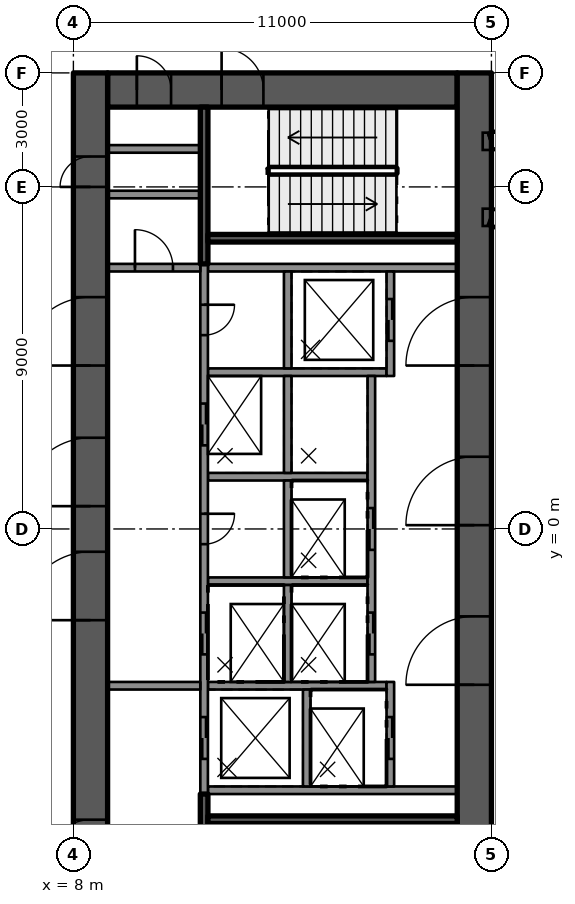
"""IFC4 building model, lengths in metres.
Left out: names, types, materials, properties, quantities, classifications, styles, units other than length and angle.
Written with IfcOpenShell. Run it as: python <this file> out.ifc"""

import sys

from ifc_helpers import new_model, si_unit, direction, frame, frame_2d, origin, place, context, subcontext, project, spatial, rectangle, extrude, element, fill, save


model = new_model("IFC4")
c1 = context("Model", 3, precision=1e-05, world=origin(), true_north=direction((0.0, 1.0)))
c2 = subcontext(c1, "Body", "Model", "MODEL_VIEW")
j1 = project(units=[si_unit("LENGTHUNIT", "METRE"), si_unit("PLANEANGLEUNIT", "RADIAN")], contexts=[c1])
p1 = place(None, origin())
s1 = spatial("IfcSite", under=j1, at=p1, CompositionType="ELEMENT")
p2 = place(p1, origin())
s2 = spatial("IfcBuilding", under=s1, at=p2, CompositionType="ELEMENT")
p3 = place(p2, frame((0.0, 0.0, 141.2)))
s3 = spatial("IfcBuildingStorey", under=s2, at=p3, CompositionType="ELEMENT", Elevation=141.2)
p4 = place(p3, frame((8.9, 11.55, 0.0), z_axis=(0.0, 0.0, 1.0), x_axis=(1.0, 0.0, 0.0)))
e1 = element("IfcWall", 1, at=p4, inside=s3, PredefinedType="SHEAR", context=c2, shape_type="SweptSolid", body=[
    extrude(rectangle(XDim=9.2, YDim=0.9, at=frame_2d((4.6, 0.0))), origin(), (0.0, 0.0, 1.0), 4.4),
])
p5 = place(p4, frame((3.0, 0.0, 0.0)))
e2 = element("IfcOpeningElement", 2, at=p5, cuts=e1, PredefinedType="OPENING", context=c2, shape_type="SweptSolid", body=[
    extrude(rectangle(XDim=1.1, YDim=2.1, at=frame_2d((0.55, 1.05))), frame((0.0, 0.46, 0.0), z_axis=(0.0, -1.0, 0.0), x_axis=(1.0, 0.0, 0.0)), (0.0, 0.0, 1.0), 0.92),
])
p6 = place(p4, frame((0.77, 0.0, 0.0)))
e3 = element("IfcOpeningElement", 3, at=p6, cuts=e1, PredefinedType="OPENING", context=c2, shape_type="SweptSolid", body=[
    extrude(rectangle(XDim=0.9, YDim=2.1, at=frame_2d((0.45, 1.05))), frame((0.0, 0.46, 0.0), z_axis=(0.0, -1.0, 0.0), x_axis=(1.0, 0.0, 0.0)), (0.0, 0.0, 1.0), 0.92),
])
p7 = place(p3, frame((8.45, -12.0, 0.0), z_axis=(0.0, 0.0, 1.0), x_axis=(0.0, 1.0, 0.0)))
e4 = element("IfcWall", 4, at=p7, inside=s3, PredefinedType="SHEAR", context=c2, shape_type="SweptSolid", body=[
    extrude(rectangle(XDim=24.0, YDim=0.9, at=frame_2d((12.0, 0.0))), origin(), (0.0, 0.0, 1.0), 4.4),
])
p8 = place(p7, frame((12.6, 0.0, 0.0)))
e5 = element("IfcOpeningElement", 5, at=p8, cuts=e4, PredefinedType="OPENING", context=c2, shape_type="SweptSolid", body=[
    extrude(rectangle(XDim=1.8, YDim=2.1, at=frame_2d((0.9, 1.05))), frame((0.0, 0.46, 0.0), z_axis=(0.0, -1.0, 0.0), x_axis=(1.0, 0.0, 0.0)), (0.0, 0.0, 1.0), 0.92),
])
p9 = place(p7, frame((16.3, 0.0, 0.0)))
e6 = element("IfcOpeningElement", 6, at=p9, cuts=e4, PredefinedType="OPENING", context=c2, shape_type="SweptSolid", body=[
    extrude(rectangle(XDim=1.8, YDim=2.1, at=frame_2d((0.9, 1.05))), frame((0.0, 0.46, 0.0), z_axis=(0.0, -1.0, 0.0), x_axis=(1.0, 0.0, 0.0)), (0.0, 0.0, 1.0), 0.92),
])
p10 = place(p7, frame((9.6, 0.0, 0.0)))
e7 = element("IfcOpeningElement", 7, at=p10, cuts=e4, PredefinedType="OPENING", context=c2, shape_type="SweptSolid", body=[
    extrude(rectangle(XDim=1.8, YDim=2.1, at=frame_2d((0.9, 1.05))), frame((0.0, 0.46, 0.0), z_axis=(0.0, -1.0, 0.0), x_axis=(1.0, 0.0, 0.0)), (0.0, 0.0, 1.0), 0.92),
])
p11 = place(p7, frame((3.25, 0.0, 0.0)))
e8 = element("IfcOpeningElement", 8, at=p11, cuts=e4, PredefinedType="OPENING", context=c2, shape_type="SweptSolid", body=[
    extrude(rectangle(XDim=1.1, YDim=2.1, at=frame_2d((0.55, 1.05))), frame((0.0, 0.46, 0.0), z_axis=(0.0, -1.0, 0.0), x_axis=(1.0, 0.0, 0.0)), (0.0, 0.0, 1.0), 0.92),
])
p12 = place(p7, frame((21.0, 0.0, 0.0)))
e9 = element("IfcOpeningElement", 9, at=p12, cuts=e4, PredefinedType="OPENING", context=c2, shape_type="SweptSolid", body=[
    extrude(rectangle(XDim=0.8, YDim=2.1, at=frame_2d((0.4, 1.05))), frame((0.0, 0.46, 0.0), z_axis=(0.0, -1.0, 0.0), x_axis=(1.0, 0.0, 0.0)), (0.0, 0.0, 1.0), 0.92),
])
p13 = place(p3, frame((18.55, -12.0, 0.0), z_axis=(0.0, 0.0, 1.0), x_axis=(0.0, 1.0, 0.0)))
e10 = element("IfcWall", 10, at=p13, inside=s3, PredefinedType="SHEAR", context=c2, shape_type="SweptSolid", body=[
    extrude(rectangle(XDim=24.0, YDim=0.9, at=frame_2d((12.0, 0.0))), origin(), (0.0, 0.0, 1.0), 4.4),
])
p14 = place(p13, frame((16.3, 0.0, 0.0)))
e11 = element("IfcOpeningElement", 11, at=p14, cuts=e10, PredefinedType="OPENING", context=c2, shape_type="SweptSolid", body=[
    extrude(rectangle(XDim=1.8, YDim=2.1, at=frame_2d((0.9, 1.05))), frame((0.0, 0.46, 0.0), z_axis=(0.0, -1.0, 0.0), x_axis=(1.0, 0.0, 0.0)), (0.0, 0.0, 1.0), 0.92),
])
p15 = place(p13, frame((12.1, 0.0, 0.0)))
e12 = element("IfcOpeningElement", 12, at=p15, cuts=e10, PredefinedType="OPENING", context=c2, shape_type="SweptSolid", body=[
    extrude(rectangle(XDim=1.8, YDim=2.1, at=frame_2d((0.9, 1.05))), frame((0.0, 0.46, 0.0), z_axis=(0.0, -1.0, 0.0), x_axis=(1.0, 0.0, 0.0)), (0.0, 0.0, 1.0), 0.92),
])
p16 = place(p13, frame((7.9, 0.0, 0.0)))
e13 = element("IfcOpeningElement", 13, at=p16, cuts=e10, PredefinedType="OPENING", context=c2, shape_type="SweptSolid", body=[
    extrude(rectangle(XDim=1.8, YDim=2.1, at=frame_2d((0.9, 1.05))), frame((0.0, 0.46, 0.0), z_axis=(0.0, -1.0, 0.0), x_axis=(1.0, 0.0, 0.0)), (0.0, 0.0, 1.0), 0.92),
])
for number, where, z_axis, x_axis in (
    (14, (11.54, -6.875, 0.0), (0.0, 0.0, 1.0), (1.0, 0.0, 0.0)),
    (15, (11.54, 6.875, 0.0), (0.0, 0.0, 1.0), (1.0, 0.0, 0.0)),
):
    element("IfcWall", number, at=place(p3, frame(where, z_axis=z_axis, x_axis=x_axis)), inside=s3, PredefinedType="SOLIDWALL", context=c2, shape_type="SweptSolid", body=[
        extrude(rectangle(XDim=6.56, YDim=0.2, at=frame_2d((3.28, 0.0))), origin(), (0.0, 0.0, 1.0), 3.99),
    ])
p17 = place(p3, frame((11.54, 4.125, 0.0), z_axis=(0.0, 0.0, 1.0), x_axis=(1.0, 0.0, 0.0)))
e16 = element("IfcWall", 16, at=p17, inside=s3, PredefinedType="SOLIDWALL", context=c2, shape_type="SweptSolid", body=[
    extrude(rectangle(XDim=4.7, YDim=0.2, at=frame_2d((2.35, 0.0))), origin(), (0.0, 0.0, 1.0), 3.99),
])
for number, where, z_axis, x_axis in (
    (17, (11.54, 1.375, 0.0), (0.0, 0.0, 1.0), (1.0, 0.0, 0.0)),
    (18, (11.54, -1.375, 0.0), (0.0, 0.0, 1.0), (1.0, 0.0, 0.0)),
):
    element("IfcWall", number, at=place(p3, frame(where, z_axis=z_axis, x_axis=x_axis)), inside=s3, PredefinedType="SOLIDWALL", context=c2, shape_type="SweptSolid", body=[
        extrude(rectangle(XDim=4.2, YDim=0.2, at=frame_2d((2.1, 0.0))), origin(), (0.0, 0.0, 1.0), 3.99),
    ])
p18 = place(p3, frame((11.54, -4.125, 0.0), z_axis=(0.0, 0.0, 1.0), x_axis=(1.0, 0.0, 0.0)))
e19 = element("IfcWall", 19, at=p18, inside=s3, PredefinedType="SOLIDWALL", context=c2, shape_type="SweptSolid", body=[
    extrude(rectangle(XDim=4.7, YDim=0.2, at=frame_2d((2.35, 0.0))), origin(), (0.0, 0.0, 1.0), 3.99),
])
p19 = place(p3, frame((11.44, 6.975, 0.0), z_axis=(0.0, 0.0, 1.0), x_axis=(0.0, -1.0, 0.0)))
e20 = element("IfcWall", 20, at=p19, inside=s3, PredefinedType="SOLIDWALL", context=c2, shape_type="SweptSolid", body=[
    extrude(rectangle(XDim=13.95, YDim=0.2, at=frame_2d((6.975, 0.0))), origin(), (0.0, 0.0, 1.0), 3.99),
])
p20 = place(p19, frame((3.675, 0.0, 0.0)))
e21 = element("IfcOpeningElement", 21, at=p20, cuts=e20, PredefinedType="OPENING", context=c2, shape_type="SweptSolid", body=[
    extrude(rectangle(XDim=1.1, YDim=2.1, at=frame_2d((0.55, 1.05))), frame((0.0, 0.11, 0.0), z_axis=(0.0, -1.0, 0.0), x_axis=(1.0, 0.0, 0.0)), (0.0, 0.0, 1.0), 0.22),
])
p21 = place(p19, frame((9.175, 0.0, 0.0)))
e22 = element("IfcOpeningElement", 22, at=p21, cuts=e20, PredefinedType="OPENING", context=c2, shape_type="SweptSolid", body=[
    extrude(rectangle(XDim=1.1, YDim=2.1, at=frame_2d((0.55, 1.05))), frame((0.0, 0.11, 0.0), z_axis=(0.0, -1.0, 0.0), x_axis=(1.0, 0.0, 0.0)), (0.0, 0.0, 1.0), 0.22),
])
p22 = place(p19, frame((11.925, 0.0, 0.0)))
e23 = element("IfcOpeningElement", 23, at=p22, cuts=e20, PredefinedType="OPENING", context=c2, shape_type="SweptSolid", body=[
    extrude(rectangle(XDim=1.1, YDim=2.1, at=frame_2d((0.55, 1.05))), frame((0.0, 0.11, 0.0), z_axis=(0.0, -1.0, 0.0), x_axis=(1.0, 0.0, 0.0)), (0.0, 0.0, 1.0), 0.22),
])
p23 = place(p19, frame((1.075, 0.0, 0.0)))
e24 = element("IfcOpeningElement", 24, at=p23, cuts=e20, PredefinedType="OPENING", context=c2, shape_type="SweptSolid", body=[
    extrude(rectangle(XDim=0.8, YDim=2.1, at=frame_2d((0.4, 1.05))), frame((0.0, 0.11, 0.0), z_axis=(0.0, -1.0, 0.0), x_axis=(1.0, 0.0, 0.0)), (0.0, 0.0, 1.0), 0.22),
])
p24 = place(p19, frame((6.575, 0.0, 0.0)))
e25 = element("IfcOpeningElement", 25, at=p24, cuts=e20, PredefinedType="OPENING", context=c2, shape_type="SweptSolid", body=[
    extrude(rectangle(XDim=0.8, YDim=2.1, at=frame_2d((0.4, 1.05))), frame((0.0, 0.11, 0.0), z_axis=(0.0, -1.0, 0.0), x_axis=(1.0, 0.0, 0.0)), (0.0, 0.0, 1.0), 0.22),
])
for number, where, z_axis, x_axis in (
    (26, (13.64, 6.775, 0.0), (0.0, 0.0, 1.0), (0.0, -1.0, 0.0)),
    (27, (13.64, 4.025, 0.0), (0.0, 0.0, 1.0), (0.0, -1.0, 0.0)),
    (28, (13.64, 1.275, 0.0), (0.0, 0.0, 1.0), (0.0, -1.0, 0.0)),
    (29, (13.64, -1.475, 0.0), (0.0, 0.0, 1.0), (0.0, -1.0, 0.0)),
    (30, (14.14, -4.225, 0.0), (0.0, 0.0, 1.0), (0.0, -1.0, 0.0)),
):
    element("IfcWall", number, at=place(p3, frame(where, z_axis=z_axis, x_axis=x_axis)), inside=s3, PredefinedType="SOLIDWALL", context=c2, shape_type="SweptSolid", body=[
        extrude(rectangle(XDim=2.55, YDim=0.2, at=frame_2d((1.275, 0.0))), origin(), (0.0, 0.0, 1.0), 3.99),
    ])
p25 = place(p3, frame((16.34, 6.775, 0.0), z_axis=(0.0, 0.0, 1.0), x_axis=(0.0, -1.0, 0.0)))
e31 = element("IfcWall", 31, at=p25, inside=s3, PredefinedType="SOLIDWALL", context=c2, shape_type="SweptSolid", body=[
    extrude(rectangle(XDim=2.75, YDim=0.2, at=frame_2d((1.375, 0.0))), origin(), (0.0, 0.0, 1.0), 3.99),
])
p26 = place(p25, frame((0.725, 0.0, 0.0)))
e32 = element("IfcOpeningElement", 32, at=p26, cuts=e31, PredefinedType="OPENING", context=c2, shape_type="SweptSolid", body=[
    extrude(rectangle(XDim=1.1, YDim=2.1, at=frame_2d((0.55, 1.05))), frame((0.0, 0.11, 0.0), z_axis=(0.0, -1.0, 0.0), x_axis=(1.0, 0.0, 0.0)), (0.0, 0.0, 1.0), 0.22),
])
p27 = place(p3, frame((15.84, 4.025, 0.0), z_axis=(0.0, 0.0, 1.0), x_axis=(0.0, -1.0, 0.0)))
e33 = element("IfcWall", 33, at=p27, inside=s3, PredefinedType="SOLIDWALL", context=c2, shape_type="SweptSolid", body=[
    extrude(rectangle(XDim=8.05, YDim=0.2, at=frame_2d((4.025, 0.0))), origin(), (0.0, 0.0, 1.0), 3.99),
])
p28 = place(p27, frame((3.475, 0.0, 0.0)))
e34 = element("IfcOpeningElement", 34, at=p28, cuts=e33, PredefinedType="OPENING", context=c2, shape_type="SweptSolid", body=[
    extrude(rectangle(XDim=1.1, YDim=2.1, at=frame_2d((0.55, 1.05))), frame((0.0, 0.11, 0.0), z_axis=(0.0, -1.0, 0.0), x_axis=(1.0, 0.0, 0.0)), (0.0, 0.0, 1.0), 0.22),
])
p29 = place(p27, frame((6.225, 0.0, 0.0)))
e35 = element("IfcOpeningElement", 35, at=p29, cuts=e33, PredefinedType="OPENING", context=c2, shape_type="SweptSolid", body=[
    extrude(rectangle(XDim=1.1, YDim=2.1, at=frame_2d((0.55, 1.05))), frame((0.0, 0.11, 0.0), z_axis=(0.0, -1.0, 0.0), x_axis=(1.0, 0.0, 0.0)), (0.0, 0.0, 1.0), 0.22),
])
p30 = place(p3, frame((16.34, -4.025, 0.0), z_axis=(0.0, 0.0, 1.0), x_axis=(0.0, -1.0, 0.0)))
e36 = element("IfcWall", 36, at=p30, inside=s3, PredefinedType="SOLIDWALL", context=c2, shape_type="SweptSolid", body=[
    extrude(rectangle(XDim=2.75, YDim=0.2, at=frame_2d((1.375, 0.0))), origin(), (0.0, 0.0, 1.0), 3.99),
])
p31 = place(p30, frame((0.925, 0.0, 0.0)))
e37 = element("IfcOpeningElement", 37, at=p31, cuts=e36, PredefinedType="OPENING", context=c2, shape_type="SweptSolid", body=[
    extrude(rectangle(XDim=1.1, YDim=2.1, at=frame_2d((0.55, 1.05))), frame((0.0, 0.11, 0.0), z_axis=(0.0, -1.0, 0.0), x_axis=(1.0, 0.0, 0.0)), (0.0, 0.0, 1.0), 0.22),
])
p32 = place(p3, frame((11.44, -6.975, 0.0), z_axis=(0.0, 0.0, 1.0), x_axis=(0.0, -1.0, 0.0)))
e38 = element("IfcWall", 38, at=p32, inside=s3, PredefinedType="SOLIDWALL", context=c2, shape_type="SweptSolid", body=[
    extrude(rectangle(XDim=4.125, YDim=0.2, at=frame_2d((2.062, 0.0))), origin(), (0.0, 0.0, 1.0), 3.99),
])
p33 = place(p32, frame((2.1, 0.0, 0.0)))
e39 = element("IfcOpeningElement", 39, at=p33, cuts=e38, PredefinedType="OPENING", context=c2, shape_type="SweptSolid", body=[
    extrude(rectangle(XDim=1.1, YDim=2.1, at=frame_2d((0.55, 1.05))), frame((0.0, 0.11, 0.0), z_axis=(0.0, -1.0, 0.0), x_axis=(1.0, 0.0, 0.0)), (0.0, 0.0, 1.0), 0.22),
])
p34 = place(p3, frame((11.54, -7.65, 0.0), z_axis=(0.0, 0.0, 1.0), x_axis=(1.0, 0.0, 0.0)))
e40 = element("IfcWall", 40, at=p34, inside=s3, PredefinedType="SOLIDWALL", context=c2, shape_type="SweptSolid", body=[
    extrude(rectangle(XDim=6.56, YDim=0.2, at=frame_2d((3.28, 0.0))), origin(), (0.0, 0.0, 1.0), 3.99),
])
p35 = place(p3, frame((11.44, 11.1, 0.0), z_axis=(0.0, 0.0, 1.0), x_axis=(0.0, -1.0, 0.0)))
e41 = element("IfcWall", 41, at=p35, inside=s3, PredefinedType="SOLIDWALL", context=c2, shape_type="SweptSolid", body=[
    extrude(rectangle(XDim=4.125, YDim=0.2, at=frame_2d((2.062, 0.0))), origin(), (0.0, 0.0, 1.0), 3.99),
])
p36 = place(p3, frame((11.54, 7.65, 0.0), z_axis=(0.0, 0.0, 1.0), x_axis=(1.0, 0.0, 0.0)))
e42 = element("IfcWall", 42, at=p36, inside=s3, PredefinedType="SOLIDWALL", context=c2, shape_type="SweptSolid", body=[
    extrude(rectangle(XDim=6.56, YDim=0.2, at=frame_2d((3.28, 0.0))), origin(), (0.0, 0.0, 1.0), 3.99),
])
p37 = place(p3, frame((8.9, -4.125, 0.0), z_axis=(0.0, 0.0, 1.0), x_axis=(1.0, 0.0, 0.0)))
e43 = element("IfcWall", 43, at=p37, inside=s3, PredefinedType="PARTITIONING", context=c2, shape_type="SweptSolid", body=[
    extrude(rectangle(XDim=2.44, YDim=0.2, at=frame_2d((1.22, 0.0))), origin(), (0.0, 0.0, 1.0), 3.99),
])
p38 = place(p3, frame((8.9, 6.875, 0.0), z_axis=(0.0, 0.0, 1.0), x_axis=(1.0, 0.0, 0.0)))
e44 = element("IfcWall", 44, at=p38, inside=s3, PredefinedType="PARTITIONING", context=c2, shape_type="SweptSolid", body=[
    extrude(rectangle(XDim=2.44, YDim=0.2, at=frame_2d((1.22, 0.0))), origin(), (0.0, 0.0, 1.0), 3.99),
])
p39 = place(p38, frame((0.72, 0.0, 0.0)))
e45 = element("IfcOpeningElement", 45, at=p39, cuts=e44, PredefinedType="OPENING", context=c2, shape_type="SweptSolid", body=[
    extrude(rectangle(XDim=1.0, YDim=2.1, at=frame_2d((0.5, 1.05))), frame((0.0, 0.11, 0.0), z_axis=(0.0, -1.0, 0.0), x_axis=(1.0, 0.0, 0.0)), (0.0, 0.0, 1.0), 0.22),
])
for number, where, z_axis, x_axis in (
    (46, (8.9, 10.0, 0.0), (0.0, 0.0, 1.0), (1.0, 0.0, 0.0)),
    (47, (8.9, 8.8, 0.0), (0.0, 0.0, 1.0), (1.0, 0.0, 0.0)),
):
    element("IfcWall", number, at=place(p3, frame(where, z_axis=z_axis, x_axis=x_axis)), inside=s3, PredefinedType="PARTITIONING", context=c2, shape_type="SweptSolid", body=[
        extrude(rectangle(XDim=2.44, YDim=0.2, at=frame_2d((1.22, 0.0))), origin(), (0.0, 0.0, 1.0), 3.99),
    ])
p40 = place(p26, origin())
e48 = element("IfcDoor", 48, at=p40, inside=s3, OperationType="DOUBLE_DOOR_SLIDING", PredefinedType="DOOR", context=c2, shape_type="SweptSolid", body=[
    extrude(rectangle(XDim=1.1, YDim=2.1, at=frame_2d((0.55, 1.05))), frame((0.0, 0.025, 0.0), z_axis=(0.0, -1.0, 0.0), x_axis=(1.0, 0.0, 0.0)), (0.0, 0.0, 1.0), 0.05),
])
fill(e32, e48)
p41 = place(p20, origin())
e49 = element("IfcDoor", 49, at=p41, inside=s3, OperationType="DOUBLE_DOOR_SLIDING", PredefinedType="DOOR", context=c2, shape_type="SweptSolid", body=[
    extrude(rectangle(XDim=1.1, YDim=2.1, at=frame_2d((0.55, 1.05))), frame((0.0, 0.025, 0.0), z_axis=(0.0, -1.0, 0.0), x_axis=(1.0, 0.0, 0.0)), (0.0, 0.0, 1.0), 0.05),
])
fill(e21, e49)
p42 = place(p28, origin())
e50 = element("IfcDoor", 50, at=p42, inside=s3, OperationType="DOUBLE_DOOR_SLIDING", PredefinedType="DOOR", context=c2, shape_type="SweptSolid", body=[
    extrude(rectangle(XDim=1.1, YDim=2.1, at=frame_2d((0.55, 1.05))), frame((0.0, 0.025, 0.0), z_axis=(0.0, -1.0, 0.0), x_axis=(1.0, 0.0, 0.0)), (0.0, 0.0, 1.0), 0.05),
])
fill(e34, e50)
p43 = place(p21, origin())
e51 = element("IfcDoor", 51, at=p43, inside=s3, OperationType="DOUBLE_DOOR_SLIDING", PredefinedType="DOOR", context=c2, shape_type="SweptSolid", body=[
    extrude(rectangle(XDim=1.1, YDim=2.1, at=frame_2d((0.55, 1.05))), frame((0.0, 0.025, 0.0), z_axis=(0.0, -1.0, 0.0), x_axis=(1.0, 0.0, 0.0)), (0.0, 0.0, 1.0), 0.05),
])
fill(e22, e51)
p44 = place(p29, origin())
e52 = element("IfcDoor", 52, at=p44, inside=s3, OperationType="DOUBLE_DOOR_SLIDING", PredefinedType="DOOR", context=c2, shape_type="SweptSolid", body=[
    extrude(rectangle(XDim=1.1, YDim=2.1, at=frame_2d((0.55, 1.05))), frame((0.0, 0.025, 0.0), z_axis=(0.0, -1.0, 0.0), x_axis=(1.0, 0.0, 0.0)), (0.0, 0.0, 1.0), 0.05),
])
fill(e35, e52)
p45 = place(p22, origin())
e53 = element("IfcDoor", 53, at=p45, inside=s3, OperationType="DOUBLE_DOOR_SLIDING", PredefinedType="DOOR", context=c2, shape_type="SweptSolid", body=[
    extrude(rectangle(XDim=1.1, YDim=2.1, at=frame_2d((0.55, 1.05))), frame((0.0, 0.025, 0.0), z_axis=(0.0, -1.0, 0.0), x_axis=(1.0, 0.0, 0.0)), (0.0, 0.0, 1.0), 0.05),
])
fill(e23, e53)
p46 = place(p31, origin())
e54 = element("IfcDoor", 54, at=p46, inside=s3, OperationType="DOUBLE_DOOR_SLIDING", PredefinedType="DOOR", context=c2, shape_type="SweptSolid", body=[
    extrude(rectangle(XDim=1.1, YDim=2.1, at=frame_2d((0.55, 1.05))), frame((0.0, 0.025, 0.0), z_axis=(0.0, -1.0, 0.0), x_axis=(1.0, 0.0, 0.0)), (0.0, 0.0, 1.0), 0.05),
])
fill(e37, e54)
p47 = place(p23, origin())
e55 = element("IfcDoor", 55, at=p47, inside=s3, OperationType="SINGLE_SWING_LEFT", PredefinedType="DOOR", context=c2, shape_type="SweptSolid", body=[
    extrude(rectangle(XDim=0.8, YDim=2.1, at=frame_2d((0.4, 1.05))), frame((0.0, 0.025, 0.0), z_axis=(0.0, -1.0, 0.0), x_axis=(1.0, 0.0, 0.0)), (0.0, 0.0, 1.0), 0.05),
])
fill(e24, e55)
p48 = place(p24, origin())
e56 = element("IfcDoor", 56, at=p48, inside=s3, OperationType="SINGLE_SWING_LEFT", PredefinedType="DOOR", context=c2, shape_type="SweptSolid", body=[
    extrude(rectangle(XDim=0.8, YDim=2.1, at=frame_2d((0.4, 1.05))), frame((0.0, 0.025, 0.0), z_axis=(0.0, -1.0, 0.0), x_axis=(1.0, 0.0, 0.0)), (0.0, 0.0, 1.0), 0.05),
])
fill(e25, e56)
p49 = place(p8, origin())
e57 = element("IfcDoor", 57, at=p49, inside=s3, OperationType="SINGLE_SWING_RIGHT", PredefinedType="DOOR", context=c2, shape_type="SweptSolid", body=[
    extrude(rectangle(XDim=1.8, YDim=2.1, at=frame_2d((0.9, 1.05))), frame((0.0, 0.025, 0.0), z_axis=(0.0, -1.0, 0.0), x_axis=(1.0, 0.0, 0.0)), (0.0, 0.0, 1.0), 0.05),
])
fill(e5, e57)
p50 = place(p14, origin())
e58 = element("IfcDoor", 58, at=p50, inside=s3, OperationType="SINGLE_SWING_RIGHT", PredefinedType="DOOR", context=c2, shape_type="SweptSolid", body=[
    extrude(rectangle(XDim=1.8, YDim=2.1, at=frame_2d((0.9, 1.05))), frame((0.0, 0.025, 0.0), z_axis=(0.0, -1.0, 0.0), x_axis=(1.0, 0.0, 0.0)), (0.0, 0.0, 1.0), 0.05),
])
fill(e11, e58)
p51 = place(p15, origin())
e59 = element("IfcDoor", 59, at=p51, inside=s3, OperationType="SINGLE_SWING_RIGHT", PredefinedType="DOOR", context=c2, shape_type="SweptSolid", body=[
    extrude(rectangle(XDim=1.8, YDim=2.1, at=frame_2d((0.9, 1.05))), frame((0.0, 0.025, 0.0), z_axis=(0.0, -1.0, 0.0), x_axis=(1.0, 0.0, 0.0)), (0.0, 0.0, 1.0), 0.05),
])
fill(e12, e59)
p52 = place(p16, origin())
e60 = element("IfcDoor", 60, at=p52, inside=s3, OperationType="SINGLE_SWING_LEFT", PredefinedType="DOOR", context=c2, shape_type="SweptSolid", body=[
    extrude(rectangle(XDim=1.8, YDim=2.1, at=frame_2d((0.9, 1.05))), frame((0.0, 0.025, 0.0), z_axis=(0.0, -1.0, 0.0), x_axis=(1.0, 0.0, 0.0)), (0.0, 0.0, 1.0), 0.05),
])
fill(e13, e60)
p53 = place(p9, origin())
e61 = element("IfcDoor", 61, at=p53, inside=s3, OperationType="SINGLE_SWING_RIGHT", PredefinedType="DOOR", context=c2, shape_type="SweptSolid", body=[
    extrude(rectangle(XDim=1.8, YDim=2.1, at=frame_2d((0.9, 1.05))), frame((0.0, 0.025, 0.0), z_axis=(0.0, -1.0, 0.0), x_axis=(1.0, 0.0, 0.0)), (0.0, 0.0, 1.0), 0.05),
])
fill(e6, e61)
p54 = place(p10, origin())
e62 = element("IfcDoor", 62, at=p54, inside=s3, OperationType="SINGLE_SWING_LEFT", PredefinedType="DOOR", context=c2, shape_type="SweptSolid", body=[
    extrude(rectangle(XDim=1.8, YDim=2.1, at=frame_2d((0.9, 1.05))), frame((0.0, 0.025, 0.0), z_axis=(0.0, -1.0, 0.0), x_axis=(1.0, 0.0, 0.0)), (0.0, 0.0, 1.0), 0.05),
])
fill(e7, e62)
p55 = place(p11, origin())
e63 = element("IfcDoor", 63, at=p55, inside=s3, OperationType="SINGLE_SWING_LEFT", PredefinedType="DOOR", context=c2, shape_type="SweptSolid", body=[
    extrude(rectangle(XDim=1.1, YDim=2.1, at=frame_2d((0.55, 1.05))), frame((0.0, 0.025, 0.0), z_axis=(0.0, -1.0, 0.0), x_axis=(1.0, 0.0, 0.0)), (0.0, 0.0, 1.0), 0.05),
])
fill(e8, e63)
p56 = place(p5, origin())
e64 = element("IfcDoor", 64, at=p56, inside=s3, OperationType="SINGLE_SWING_LEFT", PredefinedType="DOOR", context=c2, shape_type="SweptSolid", body=[
    extrude(rectangle(XDim=1.1, YDim=2.1, at=frame_2d((0.55, 1.05))), frame((0.0, 0.025, 0.0), z_axis=(0.0, -1.0, 0.0), x_axis=(1.0, 0.0, 0.0)), (0.0, 0.0, 1.0), 0.05),
])
fill(e2, e64)
p57 = place(p6, origin())
e65 = element("IfcDoor", 65, at=p57, inside=s3, OperationType="SINGLE_SWING_LEFT", PredefinedType="DOOR", context=c2, shape_type="SweptSolid", body=[
    extrude(rectangle(XDim=0.9, YDim=2.1, at=frame_2d((0.45, 1.05))), frame((0.0, 0.025, 0.0), z_axis=(0.0, -1.0, 0.0), x_axis=(1.0, 0.0, 0.0)), (0.0, 0.0, 1.0), 0.05),
])
fill(e3, e65)
p58 = place(p12, origin())
e66 = element("IfcDoor", 66, at=p58, inside=s3, OperationType="SINGLE_SWING_RIGHT", PredefinedType="DOOR", context=c2, shape_type="SweptSolid", body=[
    extrude(rectangle(XDim=0.8, YDim=2.1, at=frame_2d((0.4, 1.05))), frame((0.0, 0.025, 0.0), z_axis=(0.0, -1.0, 0.0), x_axis=(1.0, 0.0, 0.0)), (0.0, 0.0, 1.0), 0.05),
])
fill(e9, e66)
p59 = place(p39, origin())
e67 = element("IfcDoor", 67, at=p59, inside=s3, OperationType="SINGLE_SWING_RIGHT", PredefinedType="DOOR", context=c2, shape_type="SweptSolid", body=[
    extrude(rectangle(XDim=1.0, YDim=2.1, at=frame_2d((0.5, 1.05))), frame((0.0, 0.025, 0.0), z_axis=(0.0, -1.0, 0.0), x_axis=(1.0, 0.0, 0.0)), (0.0, 0.0, 1.0), 0.05),
])
fill(e45, e67)
save(model, sys.argv[1])
